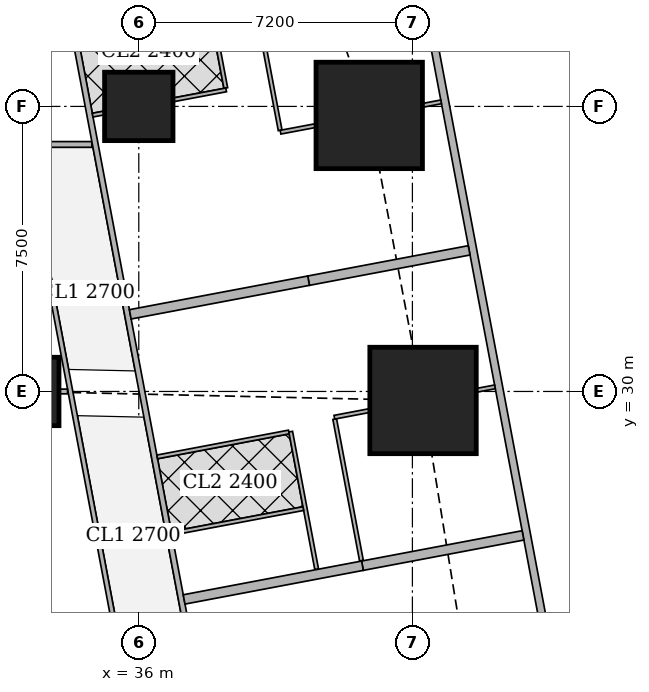
"""IFC4 building model, lengths in metres.
Left out: names, types, materials, properties, quantities, classifications, styles, units other than length and angle.
Written with IfcOpenShell. Run it as: python <this file> out.ifc"""

import sys

from ifc_helpers import new_model, si_unit, direction, frame, frame_2d, origin, origin_2d, place, context, subcontext, project, spatial, rectangle, extrude, element, fill, save


model = new_model("IFC4")
c1 = context("Model", 3, precision=1e-05, world=origin(), true_north=direction((0.0, 1.0)))
c2 = subcontext(c1, "Body", "Model", "MODEL_VIEW")
j1 = project(units=[si_unit("LENGTHUNIT", "METRE"), si_unit("PLANEANGLEUNIT", "RADIAN")], contexts=[c1])
p1 = place(None, origin())
s1 = spatial("IfcSite", under=j1, at=p1, CompositionType="ELEMENT")
p2 = place(p1, origin())
s2 = spatial("IfcBuilding", under=s1, at=p2, CompositionType="ELEMENT")
p3 = place(p2, frame((0.0, 0.0, 42.5)))
s3 = spatial("IfcBuildingStorey", under=s2, at=p3, CompositionType="ELEMENT", Elevation=42.5)
p4 = place(p3, frame((33.0, 30.0, 0.0), z_axis=(0.0, 0.0, 1.0), x_axis=(1.0, 0.0, 0.0)))
e1 = element("IfcColumn", 1, at=p4, inside=s3, PredefinedType="COLUMN", context=c2, shape_type="SweptSolid", body=[
    extrude(rectangle(XDim=1.8, YDim=1.8, at=origin_2d()), origin(), (0.0, 0.0, 1.0), 3.75),
])
p5 = place(p3, frame((43.48, 29.763, 0.0), z_axis=(0.0, 0.0, 1.0), x_axis=(1.0, 0.0, 0.0)))
e2 = element("IfcColumn", 2, at=p5, inside=s3, PredefinedType="COLUMN", context=c2, shape_type="SweptSolid", body=[
    extrude(rectangle(XDim=2.8, YDim=2.8, at=origin_2d()), origin(), (0.0, 0.0, 1.0), 3.75),
])
p6 = place(p3, frame((36.0, 37.5, 0.0), z_axis=(0.0, 0.0, 1.0), x_axis=(1.0, 0.0, 0.0)))
e3 = element("IfcColumn", 3, at=p6, inside=s3, PredefinedType="COLUMN", context=c2, shape_type="SweptSolid", body=[
    extrude(rectangle(XDim=1.8, YDim=1.8, at=origin_2d()), origin(), (0.0, 0.0, 1.0), 3.75),
])
p7 = place(p3, frame((42.064, 37.263, 0.0), z_axis=(0.0, 0.0, 1.0), x_axis=(1.0, 0.0, 0.0)))
e4 = element("IfcColumn", 4, at=p7, inside=s3, PredefinedType="COLUMN", context=c2, shape_type="SweptSolid", body=[
    extrude(rectangle(XDim=2.8, YDim=2.8, at=origin_2d()), origin(), (0.0, 0.0, 1.0), 3.75),
])
p8 = place(p3, frame((50.653, 2.703, 0.0), z_axis=(0.0, 0.0, 1.0), x_axis=(-0.185612026696, 0.982623109613, 0.0)))
e5 = element("IfcWall", 5, at=p8, inside=s3, PredefinedType="SOLIDWALL", context=c2, shape_type="SweptSolid", body=[
    extrude(rectangle(XDim=41.393, YDim=0.2, at=frame_2d((20.697, 0.0))), origin(), (0.0, 0.0, 1.0), 3.5),
])
p9 = place(p8, frame((1.633, 0.0, 0.9)))
e6 = element("IfcOpeningElement", 6, at=p9, cuts=e5, PredefinedType="OPENING", context=c2, shape_type="SweptSolid", body=[
    extrude(rectangle(XDim=1.8, YDim=1.5, at=frame_2d((0.9, 0.75))), frame((0.0, 0.11, 0.0), z_axis=(0.0, -1.0, 0.0), x_axis=(1.0, 0.0, 0.0)), (0.0, 0.0, 1.0), 0.22),
])
p10 = place(p8, frame((6.032, 0.0, 0.9)))
e7 = element("IfcOpeningElement", 7, at=p10, cuts=e5, PredefinedType="OPENING", context=c2, shape_type="SweptSolid", body=[
    extrude(rectangle(XDim=1.8, YDim=1.5, at=frame_2d((0.9, 0.75))), frame((0.0, 0.11, 0.0), z_axis=(0.0, -1.0, 0.0), x_axis=(1.0, 0.0, 0.0)), (0.0, 0.0, 1.0), 0.22),
])
p11 = place(p8, frame((9.848, 0.0, 0.9)))
e8 = element("IfcOpeningElement", 8, at=p11, cuts=e5, PredefinedType="OPENING", context=c2, shape_type="SweptSolid", body=[
    extrude(rectangle(XDim=1.8, YDim=1.5, at=frame_2d((0.9, 0.75))), frame((0.0, 0.11, 0.0), z_axis=(0.0, -1.0, 0.0), x_axis=(1.0, 0.0, 0.0)), (0.0, 0.0, 1.0), 0.22),
])
p12 = place(p8, frame((17.481, 0.0, 0.9)))
e9 = element("IfcOpeningElement", 9, at=p12, cuts=e5, PredefinedType="OPENING", context=c2, shape_type="SweptSolid", body=[
    extrude(rectangle(XDim=1.8, YDim=1.5, at=frame_2d((0.9, 0.75))), frame((0.0, 0.11, 0.0), z_axis=(0.0, -1.0, 0.0), x_axis=(1.0, 0.0, 0.0)), (0.0, 0.0, 1.0), 0.22),
])
p13 = place(p8, frame((21.297, 0.0, 0.9)))
e10 = element("IfcOpeningElement", 10, at=p13, cuts=e5, PredefinedType="OPENING", context=c2, shape_type="SweptSolid", body=[
    extrude(rectangle(XDim=1.8, YDim=1.5, at=frame_2d((0.9, 0.75))), frame((0.0, 0.11, 0.0), z_axis=(0.0, -1.0, 0.0), x_axis=(1.0, 0.0, 0.0)), (0.0, 0.0, 1.0), 0.22),
])
p14 = place(p8, frame((25.113, 0.0, 0.9)))
e11 = element("IfcOpeningElement", 11, at=p14, cuts=e5, PredefinedType="OPENING", context=c2, shape_type="SweptSolid", body=[
    extrude(rectangle(XDim=1.8, YDim=1.5, at=frame_2d((0.9, 0.75))), frame((0.0, 0.11, 0.0), z_axis=(0.0, -1.0, 0.0), x_axis=(1.0, 0.0, 0.0)), (0.0, 0.0, 1.0), 0.22),
])
p15 = place(p8, frame((28.93, 0.0, 0.9)))
e12 = element("IfcOpeningElement", 12, at=p15, cuts=e5, PredefinedType="OPENING", context=c2, shape_type="SweptSolid", body=[
    extrude(rectangle(XDim=1.8, YDim=1.5, at=frame_2d((0.9, 0.75))), frame((0.0, 0.11, 0.0), z_axis=(0.0, -1.0, 0.0), x_axis=(1.0, 0.0, 0.0)), (0.0, 0.0, 1.0), 0.22),
])
p16 = place(p8, frame((32.746, 0.0, 0.9)))
e13 = element("IfcOpeningElement", 13, at=p16, cuts=e5, PredefinedType="OPENING", context=c2, shape_type="SweptSolid", body=[
    extrude(rectangle(XDim=1.8, YDim=1.5, at=frame_2d((0.9, 0.75))), frame((0.0, 0.11, 0.0), z_axis=(0.0, -1.0, 0.0), x_axis=(1.0, 0.0, 0.0)), (0.0, 0.0, 1.0), 0.22),
])
p17 = place(p8, frame((36.481, 0.0, 0.9)))
e14 = element("IfcOpeningElement", 14, at=p17, cuts=e5, PredefinedType="OPENING", context=c2, shape_type="SweptSolid", body=[
    extrude(rectangle(XDim=1.8, YDim=1.5, at=frame_2d((0.9, 0.75))), frame((0.0, 0.11, 0.0), z_axis=(0.0, -1.0, 0.0), x_axis=(1.0, 0.0, 0.0)), (0.0, 0.0, 1.0), 0.22),
])
p18 = place(p3, frame((8.35, 36.5, 0.0), z_axis=(0.0, 0.0, 1.0), x_axis=(1.0, 0.0, 0.0)))
e15 = element("IfcWall", 15, at=p18, inside=s3, PredefinedType="SOLIDWALL", context=c2, shape_type="SweptSolid", body=[
    extrude(rectangle(XDim=26.415, YDim=0.15, at=frame_2d((13.208, 0.0))), origin(), (0.0, 0.0, 1.0), 3.5),
])
p19 = place(p18, frame((3.383, 0.0, 0.0)))
e16 = element("IfcOpeningElement", 16, at=p19, cuts=e15, PredefinedType="OPENING", context=c2, shape_type="SweptSolid", body=[
    extrude(rectangle(XDim=1.0, YDim=2.1, at=frame_2d((0.5, 1.05))), frame((0.0, 0.085, 0.0), z_axis=(0.0, -1.0, 0.0), x_axis=(1.0, 0.0, 0.0)), (0.0, 0.0, 1.0), 0.17),
])
p20 = place(p18, frame((7.65, 0.0, 0.0)))
e17 = element("IfcOpeningElement", 17, at=p20, cuts=e15, PredefinedType="OPENING", context=c2, shape_type="SweptSolid", body=[
    extrude(rectangle(XDim=1.0, YDim=2.1, at=frame_2d((0.5, 1.05))), frame((0.0, 0.085, 0.0), z_axis=(0.0, -1.0, 0.0), x_axis=(1.0, 0.0, 0.0)), (0.0, 0.0, 1.0), 0.17),
])
p21 = place(p18, frame((14.85, 0.0, 0.0)))
e18 = element("IfcOpeningElement", 18, at=p21, cuts=e15, PredefinedType="OPENING", context=c2, shape_type="SweptSolid", body=[
    extrude(rectangle(XDim=1.0, YDim=2.1, at=frame_2d((0.5, 1.05))), frame((0.0, 0.085, 0.0), z_axis=(0.0, -1.0, 0.0), x_axis=(1.0, 0.0, 0.0)), (0.0, 0.0, 1.0), 0.17),
])
p22 = place(p18, frame((23.923, 0.0, 0.0)))
e19 = element("IfcOpeningElement", 19, at=p22, cuts=e15, PredefinedType="OPENING", context=c2, shape_type="SweptSolid", body=[
    extrude(rectangle(XDim=1.0, YDim=2.1, at=frame_2d((0.5, 1.05))), frame((0.0, 0.085, 0.0), z_axis=(0.0, -1.0, 0.0), x_axis=(1.0, 0.0, 0.0)), (0.0, 0.0, 1.0), 0.17),
])
p23 = place(p3, frame((33.68, 42.723, 0.0), z_axis=(0.0, 0.0, 1.0), x_axis=(0.185624129307, -0.98262082342, 0.0)))
e20 = element("IfcWall", 20, at=p23, inside=s3, PredefinedType="SOLIDWALL", context=c2, shape_type="SweptSolid", body=[
    extrude(rectangle(XDim=41.051, YDim=0.15, at=frame_2d((20.526, 0.0))), origin(), (0.0, 0.0, 1.0), 2.5),
])
p24 = place(p23, frame((7.73, 0.0, 0.0)))
e21 = element("IfcOpeningElement", 21, at=p24, cuts=e20, PredefinedType="OPENING", context=c2, shape_type="SweptSolid", body=[
    extrude(rectangle(XDim=1.0, YDim=2.1, at=frame_2d((0.5, 1.05))), frame((0.0, 0.085, 0.0), z_axis=(0.0, -1.0, 0.0), x_axis=(1.0, 0.0, 0.0)), (0.0, 0.0, 1.0), 0.17),
])
p25 = place(p23, frame((12.307, 0.0, 0.0)))
e22 = element("IfcOpeningElement", 22, at=p25, cuts=e20, PredefinedType="OPENING", context=c2, shape_type="SweptSolid", body=[
    extrude(rectangle(XDim=1.0, YDim=2.1, at=frame_2d((0.5, 1.05))), frame((0.0, 0.085, 0.0), z_axis=(0.0, -1.0, 0.0), x_axis=(1.0, 0.0, 0.0)), (0.0, 0.0, 1.0), 0.17),
])
p26 = place(p23, frame((19.938, 0.0, 0.0)))
e23 = element("IfcOpeningElement", 23, at=p26, cuts=e20, PredefinedType="OPENING", context=c2, shape_type="SweptSolid", body=[
    extrude(rectangle(XDim=1.0, YDim=2.1, at=frame_2d((0.5, 1.05))), frame((0.0, 0.085, 0.0), z_axis=(0.0, -1.0, 0.0), x_axis=(1.0, 0.0, 0.0)), (0.0, 0.0, 1.0), 0.17),
])
p27 = place(p23, frame((32.193, 0.0, 0.0)))
e24 = element("IfcOpeningElement", 24, at=p27, cuts=e20, PredefinedType="OPENING", context=c2, shape_type="SweptSolid", body=[
    extrude(rectangle(XDim=1.0, YDim=2.1, at=frame_2d((0.5, 1.05))), frame((0.0, 0.085, 0.0), z_axis=(0.0, -1.0, 0.0), x_axis=(1.0, 0.0, 0.0)), (0.0, 0.0, 1.0), 0.17),
])
p28 = place(p3, frame((38.899, 41.22, 0.0), z_axis=(0.0, 0.0, 1.0), x_axis=(0.185517409072, -0.982640977637, 0.0)))
e25 = element("IfcWall", 25, at=p28, inside=s3, PredefinedType="PARTITIONING", context=c2, shape_type="SweptSolid", body=[
    extrude(rectangle(XDim=4.426, YDim=0.1, at=frame_2d((2.213, 0.0))), origin(), (0.0, 0.0, 1.0), 3.5),
])
p29 = place(p28, frame((1.9, 0.0, 0.0)))
e26 = element("IfcOpeningElement", 26, at=p29, cuts=e25, PredefinedType="OPENING", context=c2, shape_type="SweptSolid", body=[
    extrude(rectangle(XDim=0.9, YDim=2.1, at=frame_2d((0.45, 1.05))), frame((0.0, 0.06, 0.0), z_axis=(0.0, -1.0, 0.0), x_axis=(1.0, 0.0, 0.0)), (0.0, 0.0, 1.0), 0.12),
])
p30 = place(p3, frame((37.514, 42.089, 0.0), z_axis=(0.0, 0.0, 1.0), x_axis=(0.185540945282, -0.982636533833, 0.0)))
e27 = element("IfcWall", 27, at=p30, inside=s3, PredefinedType="PARTITIONING", context=c2, shape_type="SweptSolid", body=[
    extrude(rectangle(XDim=4.178, YDim=0.1, at=frame_2d((2.089, 0.0))), origin(), (0.0, 0.0, 1.0), 3.5),
])
p31 = place(p30, frame((2.63, 0.0, 0.0)))
e28 = element("IfcOpeningElement", 28, at=p31, cuts=e27, PredefinedType="OPENING", context=c2, shape_type="SweptSolid", body=[
    extrude(rectangle(XDim=0.9, YDim=2.1, at=frame_2d((0.45, 1.05))), frame((0.0, 0.06, 0.0), z_axis=(0.0, -1.0, 0.0), x_axis=(1.0, 0.0, 0.0)), (0.0, 0.0, 1.0), 0.12),
])
p32 = place(p3, frame((43.955, 37.62, 0.0), z_axis=(0.0, 0.0, 1.0), x_axis=(-0.982543152073, -0.186034820164, 0.0)))
e29 = element("IfcWall", 29, at=p32, inside=s3, PredefinedType="PARTITIONING", context=c2, shape_type="SweptSolid", body=[
    extrude(rectangle(XDim=0.49, YDim=0.1, at=frame_2d((0.245, 0.0))), origin(), (0.0, 0.0, 1.0), 3.5),
])
p33 = place(p3, frame((40.654, 36.996, 0.0), z_axis=(0.0, 0.0, 1.0), x_axis=(-0.982716055164, -0.185119299163, 0.0)))
e30 = element("IfcWall", 30, at=p33, inside=s3, PredefinedType="PARTITIONING", context=c2, shape_type="SweptSolid", body=[
    extrude(rectangle(XDim=0.94, YDim=0.1, at=frame_2d((0.47, 0.0))), origin(), (0.0, 0.0, 1.0), 3.5),
])
p34 = place(p3, frame((38.299, 37.935, 0.0), z_axis=(0.0, 0.0, 1.0), x_axis=(-0.982680053146, -0.185310315822, 0.0)))
e31 = element("IfcWall", 31, at=p34, inside=s3, PredefinedType="PARTITIONING", context=c2, shape_type="SweptSolid", body=[
    extrude(rectangle(XDim=1.414, YDim=0.1, at=frame_2d((0.707, 0.0))), origin(), (0.0, 0.0, 1.0), 3.5),
])
p35 = place(p3, frame((35.09, 37.328, 0.0), z_axis=(0.0, 0.0, 1.0), x_axis=(-0.982961380226, -0.183812200315, 0.0)))
e32 = element("IfcWall", 32, at=p35, inside=s3, PredefinedType="PARTITIONING", context=c2, shape_type="SweptSolid", body=[
    extrude(rectangle(XDim=0.31, YDim=0.1, at=frame_2d((0.155, 0.0))), origin(), (0.0, 0.0, 1.0), 3.5),
])
p36 = place(p3, frame((41.156, 29.273, 0.0), z_axis=(0.0, 0.0, 1.0), x_axis=(0.185474762472, -0.982649028131, 0.0)))
e33 = element("IfcWall", 33, at=p36, inside=s3, PredefinedType="PARTITIONING", context=c2, shape_type="SweptSolid", body=[
    extrude(rectangle(XDim=3.79, YDim=0.1, at=frame_2d((1.895, 0.0))), origin(), (0.0, 0.0, 1.0), 2.5),
])
p37 = place(p36, frame((1.2, 0.0, 0.0)))
e34 = element("IfcOpeningElement", 34, at=p37, cuts=e33, PredefinedType="OPENING", context=c2, shape_type="SweptSolid", body=[
    extrude(rectangle(XDim=0.9, YDim=2.1, at=frame_2d((0.45, 1.05))), frame((0.0, 0.06, 0.0), z_axis=(0.0, -1.0, 0.0), x_axis=(1.0, 0.0, 0.0)), (0.0, 0.0, 1.0), 0.12),
])
p38 = place(p3, frame((39.997, 28.942, 0.0), z_axis=(0.0, 0.0, 1.0), x_axis=(0.185580474845, -0.982629069057, 0.0)))
e35 = element("IfcWall", 35, at=p38, inside=s3, PredefinedType="PARTITIONING", context=c2, shape_type="SweptSolid", body=[
    extrude(rectangle(XDim=3.685, YDim=0.1, at=frame_2d((1.842, 0.0))), origin(), (0.0, 0.0, 1.0), 3.5),
])
p39 = place(p38, frame((0.576, 0.0, 0.0)))
e36 = element("IfcOpeningElement", 36, at=p39, cuts=e35, PredefinedType="OPENING", context=c2, shape_type="SweptSolid", body=[
    extrude(rectangle(XDim=0.9, YDim=2.1, at=frame_2d((0.45, 1.05))), frame((0.0, 0.06, 0.0), z_axis=(0.0, -1.0, 0.0), x_axis=(1.0, 0.0, 0.0)), (0.0, 0.0, 1.0), 0.12),
])
p40 = place(p38, frame((2.483, 0.0, 0.0)))
e37 = element("IfcOpeningElement", 37, at=p40, cuts=e35, PredefinedType="OPENING", context=c2, shape_type="SweptSolid", body=[
    extrude(rectangle(XDim=0.9, YDim=2.1, at=frame_2d((0.45, 1.05))), frame((0.0, 0.06, 0.0), z_axis=(0.0, -1.0, 0.0), x_axis=(1.0, 0.0, 0.0)), (0.0, 0.0, 1.0), 0.12),
])
p41 = place(p3, frame((45.372, 30.121, 0.0), z_axis=(0.0, 0.0, 1.0), x_axis=(-0.982629142467, -0.185580086147, 0.0)))
e38 = element("IfcWall", 38, at=p41, inside=s3, PredefinedType="PARTITIONING", context=c2, shape_type="SweptSolid", body=[
    extrude(rectangle(XDim=0.491, YDim=0.1, at=frame_2d((0.245, 0.0))), origin(), (0.0, 0.0, 1.0), 3.5),
])
p42 = place(p3, frame((42.07, 29.497, 0.0), z_axis=(0.0, 0.0, 1.0), x_axis=(-0.982490624992, -0.186312028067, 0.0)))
e39 = element("IfcWall", 39, at=p42, inside=s3, PredefinedType="PARTITIONING", context=c2, shape_type="SweptSolid", body=[
    extrude(rectangle(XDim=0.939, YDim=0.1, at=frame_2d((0.47, 0.0))), origin(), (0.0, 0.0, 1.0), 2.5),
])
p43 = place(p3, frame((39.948, 28.933, 0.0), z_axis=(0.0, 0.0, 1.0), x_axis=(-0.982576058723, -0.185860939478, 0.0)))
e40 = element("IfcWall", 40, at=p43, inside=s3, PredefinedType="PARTITIONING", context=c2, shape_type="SweptSolid", body=[
    extrude(rectangle(XDim=3.524, YDim=0.1, at=frame_2d((1.762, 0.0))), origin(), (0.0, 0.0, 1.0), 3.5),
])
p44 = place(p3, frame((40.329, 26.918, 0.0), z_axis=(0.0, 0.0, 1.0), x_axis=(-0.982638553676, -0.185530247748, 0.0)))
e41 = element("IfcWall", 41, at=p44, inside=s3, PredefinedType="PARTITIONING", context=c2, shape_type="SweptSolid", body=[
    extrude(rectangle(XDim=3.525, YDim=0.1, at=frame_2d((1.763, 0.0))), origin(), (0.0, 0.0, 1.0), 3.5),
])
p45 = place(p3, frame((44.693, 33.713, 0.0), z_axis=(0.0, 0.0, 1.0), x_axis=(-0.982633535512, -0.185556823879, 0.0)))
e42 = element("IfcWall", 42, at=p45, inside=s3, PredefinedType="SOLIDWALL", context=c2, shape_type="SweptSolid", body=[
    extrude(rectangle(XDim=4.3, YDim=0.25, at=frame_2d((2.15, 0.0))), origin(), (0.0, 0.0, 1.0), 2.05),
])
p46 = place(p3, frame((40.468, 32.915, 0.0), z_axis=(0.0, 0.0, 1.0), x_axis=(-0.982635807605, -0.185544791394, 0.0)))
e43 = element("IfcWall", 43, at=p46, inside=s3, PredefinedType="SOLIDWALL", context=c2, shape_type="SweptSolid", body=[
    extrude(rectangle(XDim=4.775, YDim=0.25, at=frame_2d((2.388, 0.0))), origin(), (0.0, 0.0, 1.0), 3.5),
])
p47 = place(p3, frame((46.11, 26.213, 0.0), z_axis=(0.0, 0.0, 1.0), x_axis=(-0.982633535512, -0.185556823879, 0.0)))
e44 = element("IfcWall", 44, at=p47, inside=s3, PredefinedType="SOLIDWALL", context=c2, shape_type="SweptSolid", body=[
    extrude(rectangle(XDim=4.3, YDim=0.25, at=frame_2d((2.15, 0.0))), origin(), (0.0, 0.0, 1.0), 2.05),
])
p48 = place(p3, frame((41.885, 25.415, 0.0), z_axis=(0.0, 0.0, 1.0), x_axis=(-0.982596737686, -0.185751584349, 0.0)))
e45 = element("IfcWall", 45, at=p48, inside=s3, PredefinedType="SOLIDWALL", context=c2, shape_type="SweptSolid", body=[
    extrude(rectangle(XDim=4.775, YDim=0.25, at=frame_2d((2.387, 0.0))), origin(), (0.0, 0.0, 1.0), 3.5),
])
p49 = place(p3, frame((36.861, 15.913, 0.0), z_axis=(0.0, 0.0, 1.0), x_axis=(-0.185588307143, 0.982627589808, 0.0)))
e46 = element("IfcWall", 46, at=p49, inside=s3, PredefinedType="PARTITIONING", context=c2, shape_type="SweptSolid", body=[
    extrude(rectangle(XDim=19.005, YDim=0.125, at=frame_2d((9.502, 0.0))), origin(), (0.0, 0.0, 1.0), 2.5),
])
p50 = place(p49, frame((0.25, 0.0, 0.0)))
e47 = element("IfcOpeningElement", 47, at=p50, cuts=e46, PredefinedType="OPENING", context=c2, shape_type="SweptSolid", body=[
    extrude(rectangle(XDim=1.0, YDim=2.1, at=frame_2d((0.5, 1.05))), frame((0.0, 0.073, 0.0), z_axis=(0.0, -1.0, 0.0), x_axis=(1.0, 0.0, 0.0)), (0.0, 0.0, 1.0), 0.145),
])
p51 = place(p49, frame((7.527, 0.0, 0.0)))
e48 = element("IfcOpeningElement", 48, at=p51, cuts=e46, PredefinedType="OPENING", context=c2, shape_type="SweptSolid", body=[
    extrude(rectangle(XDim=1.0, YDim=2.1, at=frame_2d((0.5, 1.05))), frame((0.0, 0.073, 0.0), z_axis=(0.0, -1.0, 0.0), x_axis=(1.0, 0.0, 0.0)), (0.0, 0.0, 1.0), 0.145),
])
p52 = place(p49, frame((15.5, 0.0, 0.0)))
e49 = element("IfcOpeningElement", 49, at=p52, cuts=e46, PredefinedType="OPENING", context=c2, shape_type="SweptSolid", body=[
    extrude(rectangle(XDim=1.0, YDim=2.1, at=frame_2d((0.5, 1.05))), frame((0.0, 0.073, 0.0), z_axis=(0.0, -1.0, 0.0), x_axis=(1.0, 0.0, 0.0)), (0.0, 0.0, 1.0), 0.145),
])
p53 = place(p3, frame((33.901, 30.0, 0.0), z_axis=(0.0, 0.0, 1.0), x_axis=(1.0, 0.0, 0.0)))
e50 = element("IfcWall", 50, at=p53, inside=s3, PredefinedType="PARTITIONING", context=c2, shape_type="SweptSolid", body=[
    extrude(rectangle(XDim=0.224, YDim=0.125, at=frame_2d((0.112, 0.0))), origin(), (0.0, 0.0, 1.0), 2.5),
])
p54 = place(p13, origin())
e51 = element("IfcWindow", 51, at=p54, inside=s3, PartitioningType="SINGLE_PANEL", PredefinedType="WINDOW", context=c2, shape_type="SweptSolid", body=[
    extrude(rectangle(XDim=1.8, YDim=1.5, at=frame_2d((0.9, 0.75))), frame((0.0, 0.03, 0.0), z_axis=(0.0, -1.0, 0.0), x_axis=(1.0, 0.0, 0.0)), (0.0, 0.0, 1.0), 0.06),
])
fill(e10, e51)
p55 = place(p14, origin())
e52 = element("IfcWindow", 52, at=p55, inside=s3, PartitioningType="SINGLE_PANEL", PredefinedType="WINDOW", context=c2, shape_type="SweptSolid", body=[
    extrude(rectangle(XDim=1.8, YDim=1.5, at=frame_2d((0.9, 0.75))), frame((0.0, 0.03, 0.0), z_axis=(0.0, -1.0, 0.0), x_axis=(1.0, 0.0, 0.0)), (0.0, 0.0, 1.0), 0.06),
])
fill(e11, e52)
p56 = place(p15, origin())
e53 = element("IfcWindow", 53, at=p56, inside=s3, PartitioningType="SINGLE_PANEL", PredefinedType="WINDOW", context=c2, shape_type="SweptSolid", body=[
    extrude(rectangle(XDim=1.8, YDim=1.5, at=frame_2d((0.9, 0.75))), frame((0.0, 0.03, 0.0), z_axis=(0.0, -1.0, 0.0), x_axis=(1.0, 0.0, 0.0)), (0.0, 0.0, 1.0), 0.06),
])
fill(e12, e53)
p57 = place(p16, origin())
e54 = element("IfcWindow", 54, at=p57, inside=s3, PartitioningType="SINGLE_PANEL", PredefinedType="WINDOW", context=c2, shape_type="SweptSolid", body=[
    extrude(rectangle(XDim=1.8, YDim=1.5, at=frame_2d((0.9, 0.75))), frame((0.0, 0.03, 0.0), z_axis=(0.0, -1.0, 0.0), x_axis=(1.0, 0.0, 0.0)), (0.0, 0.0, 1.0), 0.06),
])
fill(e13, e54)
p58 = place(p17, origin())
e55 = element("IfcWindow", 55, at=p58, inside=s3, PartitioningType="SINGLE_PANEL", PredefinedType="WINDOW", context=c2, shape_type="SweptSolid", body=[
    extrude(rectangle(XDim=1.8, YDim=1.5, at=frame_2d((0.9, 0.75))), frame((0.0, 0.03, 0.0), z_axis=(0.0, -1.0, 0.0), x_axis=(1.0, 0.0, 0.0)), (0.0, 0.0, 1.0), 0.06),
])
fill(e14, e55)
p59 = place(p29, origin())
e56 = element("IfcDoor", 56, at=p59, inside=s3, OperationType="SINGLE_SWING_LEFT", PredefinedType="DOOR", context=c2, shape_type="SweptSolid", body=[
    extrude(rectangle(XDim=0.9, YDim=2.1, at=frame_2d((0.45, 1.05))), frame((0.0, 0.025, 0.0), z_axis=(0.0, -1.0, 0.0), x_axis=(1.0, 0.0, 0.0)), (0.0, 0.0, 1.0), 0.05),
])
fill(e26, e56)
p60 = place(p31, origin())
e57 = element("IfcDoor", 57, at=p60, inside=s3, OperationType="SINGLE_SWING_LEFT", PredefinedType="DOOR", context=c2, shape_type="SweptSolid", body=[
    extrude(rectangle(XDim=0.9, YDim=2.1, at=frame_2d((0.45, 1.05))), frame((0.0, 0.025, 0.0), z_axis=(0.0, -1.0, 0.0), x_axis=(1.0, 0.0, 0.0)), (0.0, 0.0, 1.0), 0.05),
])
fill(e28, e57)
p61 = place(p24, origin())
e58 = element("IfcDoor", 58, at=p61, inside=s3, OperationType="SINGLE_SWING_RIGHT", PredefinedType="DOOR", context=c2, shape_type="SweptSolid", body=[
    extrude(rectangle(XDim=1.0, YDim=2.1, at=frame_2d((0.5, 1.05))), frame((0.0, 0.025, 0.0), z_axis=(0.0, -1.0, 0.0), x_axis=(1.0, 0.0, 0.0)), (0.0, 0.0, 1.0), 0.05),
])
fill(e21, e58)
p62 = place(p37, origin())
e59 = element("IfcDoor", 59, at=p62, inside=s3, OperationType="SINGLE_SWING_LEFT", PredefinedType="DOOR", context=c2, shape_type="SweptSolid", body=[
    extrude(rectangle(XDim=0.9, YDim=2.1, at=frame_2d((0.45, 1.05))), frame((0.0, 0.025, 0.0), z_axis=(0.0, -1.0, 0.0), x_axis=(1.0, 0.0, 0.0)), (0.0, 0.0, 1.0), 0.05),
])
fill(e34, e59)
p63 = place(p39, origin())
e60 = element("IfcDoor", 60, at=p63, inside=s3, OperationType="SINGLE_SWING_RIGHT", PredefinedType="DOOR", context=c2, shape_type="SweptSolid", body=[
    extrude(rectangle(XDim=0.9, YDim=2.1, at=frame_2d((0.45, 1.05))), frame((0.0, 0.025, 0.0), z_axis=(0.0, -1.0, 0.0), x_axis=(1.0, 0.0, 0.0)), (0.0, 0.0, 1.0), 0.05),
])
fill(e36, e60)
p64 = place(p40, origin())
e61 = element("IfcDoor", 61, at=p64, inside=s3, OperationType="SINGLE_SWING_LEFT", PredefinedType="DOOR", context=c2, shape_type="SweptSolid", body=[
    extrude(rectangle(XDim=0.9, YDim=2.1, at=frame_2d((0.45, 1.05))), frame((0.0, 0.025, 0.0), z_axis=(0.0, -1.0, 0.0), x_axis=(1.0, 0.0, 0.0)), (0.0, 0.0, 1.0), 0.05),
])
fill(e37, e61)
p65 = place(p25, origin())
e62 = element("IfcDoor", 62, at=p65, inside=s3, OperationType="SINGLE_SWING_RIGHT", PredefinedType="DOOR", context=c2, shape_type="SweptSolid", body=[
    extrude(rectangle(XDim=1.0, YDim=2.1, at=frame_2d((0.5, 1.05))), frame((0.0, 0.025, 0.0), z_axis=(0.0, -1.0, 0.0), x_axis=(1.0, 0.0, 0.0)), (0.0, 0.0, 1.0), 0.05),
])
fill(e22, e62)
p66 = place(p51, origin())
e63 = element("IfcDoor", 63, at=p66, inside=s3, OperationType="SINGLE_SWING_LEFT", PredefinedType="DOOR", context=c2, shape_type="SweptSolid", body=[
    extrude(rectangle(XDim=1.0, YDim=2.1, at=frame_2d((0.5, 1.05))), frame((0.0, 0.025, 0.0), z_axis=(0.0, -1.0, 0.0), x_axis=(1.0, 0.0, 0.0)), (0.0, 0.0, 1.0), 0.05),
])
fill(e48, e63)
p67 = place(p52, origin())
e64 = element("IfcDoor", 64, at=p67, inside=s3, OperationType="SINGLE_SWING_LEFT", PredefinedType="DOOR", context=c2, shape_type="SweptSolid", body=[
    extrude(rectangle(XDim=1.0, YDim=2.1, at=frame_2d((0.5, 1.05))), frame((0.0, 0.025, 0.0), z_axis=(0.0, -1.0, 0.0), x_axis=(1.0, 0.0, 0.0)), (0.0, 0.0, 1.0), 0.05),
])
fill(e49, e64)
save(model, sys.argv[1])
